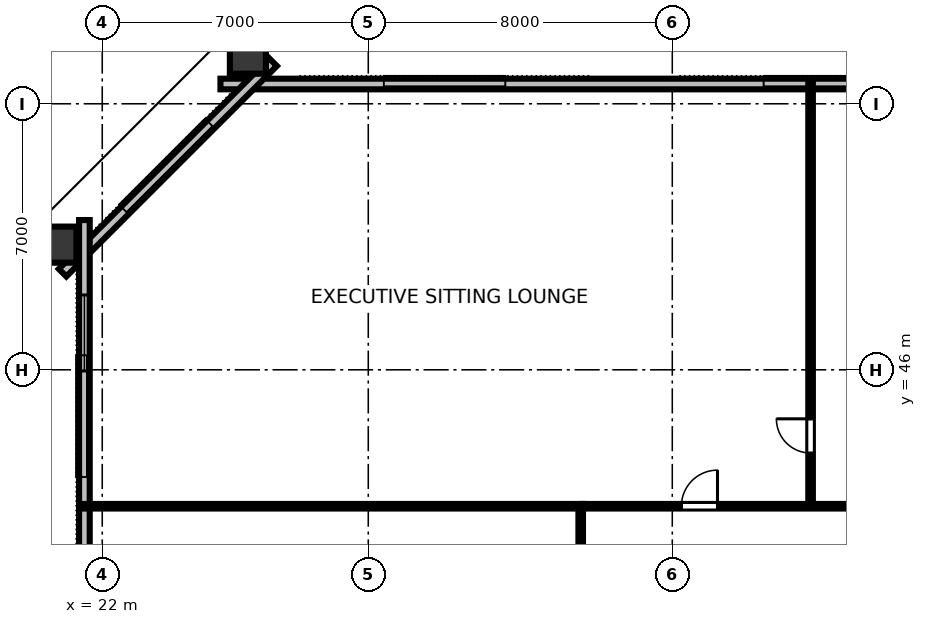
"""IFC4 building model, lengths in metres.
Left out: names, types, materials, properties, quantities, classifications, styles, units other than length and angle.
Written with IfcOpenShell. Run it as: python <this file> out.ifc"""

import sys

from ifc_helpers import new_model, si_unit, direction, frame, frame_2d, origin, origin_2d, place, context, subcontext, project, spatial, rectangle, hollow_rectangle, extrude, element, fill, save


model = new_model("IFC4")
c1 = context("Model", 3, precision=1e-05, world=origin(), true_north=direction((0.0, 1.0)))
c2 = subcontext(c1, "Body", "Model", "MODEL_VIEW")
j1 = project(units=[si_unit("LENGTHUNIT", "METRE"), si_unit("PLANEANGLEUNIT", "RADIAN")], contexts=[c1])
p1 = place(None, origin())
s1 = spatial("IfcSite", under=j1, at=p1, CompositionType="ELEMENT")
p2 = place(p1, origin())
s2 = spatial("IfcBuilding", under=s1, at=p2, CompositionType="ELEMENT")
p3 = place(p2, frame((0.0, 0.0, 60.4)))
s3 = spatial("IfcBuildingStorey", under=s2, at=p3, CompositionType="ELEMENT", Elevation=60.4)
for number, where, z_axis, x_axis in (
    (1, (25.832, 54.365, 0.0), (0.0, 0.0, 1.0), (1.0, 0.0, 0.0)),
    (2, (20.744, 49.293, 0.0), (0.0, 0.0, 1.0), (0.0, 1.0, 0.0)),
):
    element("IfcColumn", number, at=place(p3, frame(where, z_axis=z_axis, x_axis=x_axis)), inside=s3, PredefinedType="COLUMN", context=c2, shape_type="SweptSolid", body=[
        extrude(hollow_rectangle(XDim=0.95, YDim=1.15, WallThickness=0.06, at=origin_2d()), origin(), (0.0, 0.0, 1.0), 3.358),
    ])
p4 = place(p3, frame((66.89, 53.52, 0.0), z_axis=(0.0, 0.0, 1.0), x_axis=(-1.0, 0.0, 0.0)))
e3 = element("IfcWall", 3, at=p4, inside=s3, PredefinedType="STANDARD", context=c2, shape_type="SweptSolid", body=[
    extrude(rectangle(XDim=41.78, YDim=0.28, at=frame_2d((20.89, 0.0))), origin(), (0.0, 0.0, 1.0), 3.36),
])
p5 = place(p3, frame((26.496, 54.094, 0.0), z_axis=(0.0, 0.0, 1.0), x_axis=(-0.707106781187, -0.707106781187, 0.0)))
e4 = element("IfcWall", 4, at=p5, inside=s3, PredefinedType="STANDARD", context=c2, shape_type="SweptSolid", body=[
    extrude(rectangle(XDim=7.834, YDim=0.28, at=frame_2d((3.917, 0.0))), origin(), (0.0, 0.0, 1.0), 3.36),
])
p6 = place(p3, frame((21.53, 49.94, 0.0), z_axis=(0.0, 0.0, 1.0), x_axis=(0.0, -1.0, 0.0)))
e5 = element("IfcWall", 5, at=p6, inside=s3, PredefinedType="STANDARD", context=c2, shape_type="SweptSolid", body=[
    extrude(rectangle(XDim=35.88, YDim=0.28, at=frame_2d((17.94, 0.0))), origin(), (0.0, 0.0, 1.0), 3.36),
])
p7 = place(p6, frame((14.57, 0.0, 0.0)))
e6 = element("IfcOpeningElement", 6, at=p7, cuts=e5, PredefinedType="OPENING", context=c2, shape_type="SweptSolid", body=[
    extrude(rectangle(XDim=1.4, YDim=2.15, at=frame_2d((0.7, 1.075))), frame((0.0, 0.15, 0.0), z_axis=(0.0, -1.0, 0.0), x_axis=(1.0, 0.0, 0.0)), (0.0, 0.0, 1.0), 0.3),
])
p8 = place(p6, frame((1.971, 0.0, 0.8)))
e7 = element("IfcOpeningElement", 7, at=p8, cuts=e5, PredefinedType="OPENING", context=c2, shape_type="SweptSolid", body=[
    extrude(rectangle(XDim=2.0, YDim=1.95, at=frame_2d((1.0, 0.975))), frame((0.0, 0.15, 0.0), z_axis=(0.0, -1.0, 0.0), x_axis=(1.0, 0.0, 0.0)), (0.0, 0.0, 1.0), 0.3),
])
p9 = place(p6, frame((9.456, 0.0, 0.8)))
e8 = element("IfcOpeningElement", 8, at=p9, cuts=e5, PredefinedType="OPENING", context=c2, shape_type="SweptSolid", body=[
    extrude(rectangle(XDim=2.0, YDim=1.95, at=frame_2d((1.0, 0.975))), frame((0.0, 0.15, 0.0), z_axis=(0.0, -1.0, 0.0), x_axis=(1.0, 0.0, 0.0)), (0.0, 0.0, 1.0), 0.3),
])
p10 = place(p6, frame((20.682, 0.0, 0.8)))
e9 = element("IfcOpeningElement", 9, at=p10, cuts=e5, PredefinedType="OPENING", context=c2, shape_type="SweptSolid", body=[
    extrude(rectangle(XDim=2.0, YDim=1.95, at=frame_2d((1.0, 0.975))), frame((0.0, 0.15, 0.0), z_axis=(0.0, -1.0, 0.0), x_axis=(1.0, 0.0, 0.0)), (0.0, 0.0, 1.0), 0.3),
])
p11 = place(p6, frame((24.424, 0.0, 0.8)))
e10 = element("IfcOpeningElement", 10, at=p11, cuts=e5, PredefinedType="OPENING", context=c2, shape_type="SweptSolid", body=[
    extrude(rectangle(XDim=2.0, YDim=1.95, at=frame_2d((1.0, 0.975))), frame((0.0, 0.15, 0.0), z_axis=(0.0, -1.0, 0.0), x_axis=(1.0, 0.0, 0.0)), (0.0, 0.0, 1.0), 0.3),
])
p12 = place(p6, frame((31.909, 0.0, 0.8)))
e11 = element("IfcOpeningElement", 11, at=p12, cuts=e5, PredefinedType="OPENING", context=c2, shape_type="SweptSolid", body=[
    extrude(rectangle(XDim=2.0, YDim=1.95, at=frame_2d((1.0, 0.975))), frame((0.0, 0.15, 0.0), z_axis=(0.0, -1.0, 0.0), x_axis=(1.0, 0.0, 0.0)), (0.0, 0.0, 1.0), 0.3),
])
p13 = place(p3, frame((40.639, 42.41, 0.0), z_axis=(0.0, 0.0, 1.0), x_axis=(0.0, 1.0, 0.0)))
e12 = element("IfcWall", 12, at=p13, inside=s3, PredefinedType="PARTITIONING", context=c2, shape_type="SweptSolid", body=[
    extrude(rectangle(XDim=11.11, YDim=0.12, at=frame_2d((5.555, 0.0))), origin(), (0.0, 0.0, 1.0), 2.64),
])
p14 = place(p13, frame((1.4, 0.0, 0.0)))
e13 = element("IfcOpeningElement", 13, at=p14, cuts=e12, PredefinedType="OPENING", context=c2, shape_type="SweptSolid", body=[
    extrude(rectangle(XDim=0.9, YDim=2.15, at=frame_2d((0.45, 1.075))), frame((0.0, 0.07, 0.0), z_axis=(0.0, -1.0, 0.0), x_axis=(1.0, 0.0, 0.0)), (0.0, 0.0, 1.0), 0.14),
])
p15 = place(p3, frame((34.65, 42.41, 0.0), z_axis=(0.0, 0.0, 1.0), x_axis=(1.0, 0.0, 0.0)))
e14 = element("IfcWall", 14, at=p15, inside=s3, PredefinedType="PARTITIONING", context=c2, shape_type="SweptSolid", body=[
    extrude(rectangle(XDim=22.7, YDim=0.12, at=frame_2d((11.35, 0.0))), origin(), (0.0, 0.0, 1.0), 2.64),
])
p16 = place(p15, frame((2.59, 0.0, 0.0)))
e15 = element("IfcOpeningElement", 15, at=p16, cuts=e14, PredefinedType="OPENING", context=c2, shape_type="SweptSolid", body=[
    extrude(rectangle(XDim=0.95, YDim=2.15, at=frame_2d((0.475, 1.075))), frame((0.0, 0.07, 0.0), z_axis=(0.0, -1.0, 0.0), x_axis=(1.0, 0.0, 0.0)), (0.0, 0.0, 1.0), 0.14),
])
p17 = place(p15, frame((8.768, 0.0, 0.0)))
e16 = element("IfcOpeningElement", 16, at=p17, cuts=e14, PredefinedType="OPENING", context=c2, shape_type="SweptSolid", body=[
    extrude(rectangle(XDim=0.95, YDim=2.15, at=frame_2d((0.475, 1.075))), frame((0.0, 0.07, 0.0), z_axis=(0.0, -1.0, 0.0), x_axis=(1.0, 0.0, 0.0)), (0.0, 0.0, 1.0), 0.14),
])
p18 = place(p15, frame((14.079, 0.0, 0.0)))
e17 = element("IfcOpeningElement", 17, at=p18, cuts=e14, PredefinedType="OPENING", context=c2, shape_type="SweptSolid", body=[
    extrude(rectangle(XDim=0.95, YDim=2.15, at=frame_2d((0.475, 1.075))), frame((0.0, 0.07, 0.0), z_axis=(0.0, -1.0, 0.0), x_axis=(1.0, 0.0, 0.0)), (0.0, 0.0, 1.0), 0.14),
])
p19 = place(p15, frame((19.11, 0.0, 0.0)))
e18 = element("IfcOpeningElement", 18, at=p19, cuts=e14, PredefinedType="OPENING", context=c2, shape_type="SweptSolid", body=[
    extrude(rectangle(XDim=0.95, YDim=2.15, at=frame_2d((0.475, 1.075))), frame((0.0, 0.07, 0.0), z_axis=(0.0, -1.0, 0.0), x_axis=(1.0, 0.0, 0.0)), (0.0, 0.0, 1.0), 0.14),
])
p20 = place(p3, frame((34.59, 21.65, 0.0), z_axis=(0.0, 0.0, 1.0), x_axis=(0.0, 1.0, 0.0)))
e19 = element("IfcWall", 19, at=p20, inside=s3, PredefinedType="PARTITIONING", context=c2, shape_type="SweptSolid", body=[
    extrude(rectangle(XDim=20.7, YDim=0.12, at=frame_2d((10.35, 0.0))), origin(), (0.0, 0.0, 1.0), 2.64),
])
p21 = place(p20, frame((6.696, 0.0, 0.0)))
e20 = element("IfcOpeningElement", 20, at=p21, cuts=e19, PredefinedType="OPENING", context=c2, shape_type="SweptSolid", body=[
    extrude(rectangle(XDim=0.95, YDim=2.15, at=frame_2d((0.475, 1.075))), frame((0.0, 0.07, 0.0), z_axis=(0.0, -1.0, 0.0), x_axis=(1.0, 0.0, 0.0)), (0.0, 0.0, 1.0), 0.14),
])
p22 = place(p20, frame((16.846, 0.0, 0.0)))
e21 = element("IfcOpeningElement", 21, at=p22, cuts=e19, PredefinedType="OPENING", context=c2, shape_type="SweptSolid", body=[
    extrude(rectangle(XDim=0.95, YDim=2.15, at=frame_2d((0.475, 1.075))), frame((0.0, 0.07, 0.0), z_axis=(0.0, -1.0, 0.0), x_axis=(1.0, 0.0, 0.0)), (0.0, 0.0, 1.0), 0.14),
])
p23 = place(p3, frame((34.65, 42.41, 0.0), z_axis=(0.0, 0.0, 1.0), x_axis=(-1.0, 0.0, 0.0)))
e22 = element("IfcWall", 22, at=p23, inside=s3, PredefinedType="PARTITIONING", context=c2, shape_type="SweptSolid", body=[
    extrude(rectangle(XDim=13.12, YDim=0.12, at=frame_2d((6.56, 0.0))), origin(), (0.0, 0.0, 1.0), 2.64),
])
p24 = place(p8, origin())
e23 = element("IfcWindow", 23, at=p24, inside=s3, PartitioningType="SINGLE_PANEL", PredefinedType="WINDOW", context=c2, shape_type="SweptSolid", body=[
    extrude(rectangle(XDim=2.0, YDim=1.95, at=frame_2d((1.0, 0.975))), frame((0.0, 0.03, 0.0), z_axis=(0.0, -1.0, 0.0), x_axis=(1.0, 0.0, 0.0)), (0.0, 0.0, 1.0), 0.06),
])
fill(e7, e23)
p25 = place(p14, origin())
e24 = element("IfcDoor", 24, at=p25, inside=s3, OperationType="SINGLE_SWING_RIGHT", PredefinedType="DOOR", context=c2, shape_type="SweptSolid", body=[
    extrude(rectangle(XDim=0.9, YDim=2.15, at=frame_2d((0.45, 1.075))), frame((0.0, 0.025, 0.0), z_axis=(0.0, -1.0, 0.0), x_axis=(1.0, 0.0, 0.0)), (0.0, 0.0, 1.0), 0.05),
])
fill(e13, e24)
p26 = place(p16, origin())
e25 = element("IfcDoor", 25, at=p26, inside=s3, OperationType="SINGLE_SWING_RIGHT", PredefinedType="DOOR", context=c2, shape_type="SweptSolid", body=[
    extrude(rectangle(XDim=0.95, YDim=2.15, at=frame_2d((0.475, 1.075))), frame((0.0, 0.025, 0.0), z_axis=(0.0, -1.0, 0.0), x_axis=(1.0, 0.0, 0.0)), (0.0, 0.0, 1.0), 0.05),
])
fill(e15, e25)
save(model, sys.argv[1])
